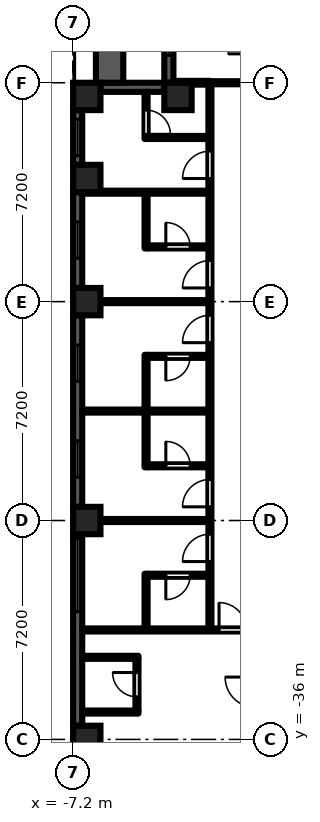
"""IFC4 building model, lengths in metres.
Left out: names, types, materials, properties, quantities, classifications, styles, units other than length and angle.
Written with IfcOpenShell. Run it as: python <this file> out.ifc"""

import sys

from ifc_helpers import new_model, si_unit, direction, frame, frame_2d, origin, origin_2d, place, context, subcontext, project, spatial, rectangle, extrude, element, fill, save


model = new_model("IFC4")
c1 = context("Model", 3, precision=1e-05, world=origin(), true_north=direction((0.0, 1.0)))
c2 = subcontext(c1, "Body", "Model", "MODEL_VIEW")
j1 = project(units=[si_unit("LENGTHUNIT", "METRE"), si_unit("PLANEANGLEUNIT", "RADIAN")], contexts=[c1])
p1 = place(None, origin())
s1 = spatial("IfcSite", under=j1, at=p1, CompositionType="ELEMENT")
p2 = place(p1, origin())
s2 = spatial("IfcBuilding", under=s1, at=p2, CompositionType="ELEMENT")
p3 = place(p2, frame((0.0, 0.0, 66.9)))
s3 = spatial("IfcBuildingStorey", under=s2, at=p3, CompositionType="ELEMENT", Elevation=66.9)
for number, where, z_axis, x_axis in (
    (1, (-6.75, -36.0, 0.0), (0.0, 0.0, 1.0), (1.0, 0.0, 0.0)),
    (2, (-6.75, -28.8, 0.0), (0.0, 0.0, 1.0), (1.0, 0.0, 0.0)),
    (3, (-6.75, -21.6, 0.0), (0.0, 0.0, 1.0), (1.0, 0.0, 0.0)),
    (4, (-6.75, -17.55, 0.0), (0.0, 0.0, 1.0), (1.0, 0.0, 0.0)),
    (5, (-6.75, -14.85, 0.0), (0.0, 0.0, 1.0), (1.0, 0.0, 0.0)),
    (6, (-3.75, -14.85, 0.0), (0.0, 0.0, 1.0), (1.0, 0.0, 0.0)),
):
    element("IfcColumn", number, at=place(p3, frame(where, z_axis=z_axis, x_axis=x_axis)), inside=s3, PredefinedType="COLUMN", context=c2, shape_type="SweptSolid", body=[
        extrude(rectangle(XDim=0.9, YDim=0.9, at=origin_2d()), origin(), (0.0, 0.0, 1.0), 3.0),
    ])
p4 = place(p3, frame((-4.05, -7.2, 0.0), z_axis=(0.0, 0.0, 1.0), x_axis=(0.0, -1.0, 0.0)))
e7 = element("IfcWall", 7, at=p4, inside=s3, PredefinedType="SOLIDWALL", context=c2, shape_type="SweptSolid", body=[
    extrude(rectangle(XDim=7.2, YDim=0.3, at=frame_2d((3.6, 0.0))), origin(), (0.0, 0.0, 1.0), 2.1),
])
p5 = place(p4, frame((3.0, 0.0, 0.0)))
e8 = element("IfcOpeningElement", 8, at=p5, cuts=e7, PredefinedType="OPENING", context=c2, shape_type="SweptSolid", body=[
    extrude(rectangle(XDim=1.2, YDim=2.05, at=frame_2d((0.6, 1.025))), frame((0.0, 0.16, 0.0), z_axis=(0.0, -1.0, 0.0), x_axis=(1.0, 0.0, 0.0)), (0.0, 0.0, 1.0), 0.32),
])
p6 = place(p4, frame((0.9, 0.0, 0.2)))
e9 = element("IfcOpeningElement", 9, at=p6, cuts=e7, PredefinedType="OPENING", context=c2, shape_type="SweptSolid", body=[
    extrude(rectangle(XDim=1.8, YDim=1.85, at=frame_2d((0.9, 0.925))), frame((0.0, 0.16, 0.0), z_axis=(0.0, -1.0, 0.0), x_axis=(1.0, 0.0, 0.0)), (0.0, 0.0, 1.0), 0.32),
])
p7 = place(p4, frame((4.5, 0.0, 0.2)))
e10 = element("IfcOpeningElement", 10, at=p7, cuts=e7, PredefinedType="OPENING", context=c2, shape_type="SweptSolid", body=[
    extrude(rectangle(XDim=1.8, YDim=1.85, at=frame_2d((0.9, 0.925))), frame((0.0, 0.16, 0.0), z_axis=(0.0, -1.0, 0.0), x_axis=(1.0, 0.0, 0.0)), (0.0, 0.0, 1.0), 0.32),
])
p8 = place(p3, frame((-4.2, -14.55, 0.0), z_axis=(0.0, 0.0, 1.0), x_axis=(-1.0, 0.0, 0.0)))
e11 = element("IfcWall", 11, at=p8, inside=s3, PredefinedType="SOLIDWALL", context=c2, shape_type="SweptSolid", body=[
    extrude(rectangle(XDim=2.1, YDim=0.3, at=frame_2d((1.05, 0.0))), origin(), (0.0, 0.0, 1.0), 2.1),
])
p9 = place(p3, frame((-7.05, -15.3, 0.0), z_axis=(0.0, 0.0, 1.0), x_axis=(0.0, -1.0, 0.0)))
e12 = element("IfcWall", 12, at=p9, inside=s3, PredefinedType="SOLIDWALL", context=c2, shape_type="SweptSolid", body=[
    extrude(rectangle(XDim=1.8, YDim=0.3, at=frame_2d((0.9, 0.0))), origin(), (0.0, 0.0, 1.0), 2.1),
])
p10 = place(p9, frame((0.3, 0.0, 0.2)))
e13 = element("IfcOpeningElement", 13, at=p10, cuts=e12, PredefinedType="OPENING", context=c2, shape_type="SweptSolid", body=[
    extrude(rectangle(XDim=1.2, YDim=1.85, at=frame_2d((0.6, 0.925))), frame((0.0, 0.16, 0.0), z_axis=(0.0, -1.0, 0.0), x_axis=(1.0, 0.0, 0.0)), (0.0, 0.0, 1.0), 0.32),
])
p11 = place(p3, frame((-7.05, -18.0, 0.0), z_axis=(0.0, 0.0, 1.0), x_axis=(0.0, -1.0, 0.0)))
e14 = element("IfcWall", 14, at=p11, inside=s3, PredefinedType="SOLIDWALL", context=c2, shape_type="SweptSolid", body=[
    extrude(rectangle(XDim=3.15, YDim=0.3, at=frame_2d((1.575, 0.0))), origin(), (0.0, 0.0, 1.0), 2.1),
])
p12 = place(p11, frame((0.975, 0.0, 0.2)))
e15 = element("IfcOpeningElement", 15, at=p12, cuts=e14, PredefinedType="OPENING", context=c2, shape_type="SweptSolid", body=[
    extrude(rectangle(XDim=1.2, YDim=1.85, at=frame_2d((0.6, 0.925))), frame((0.0, 0.16, 0.0), z_axis=(0.0, -1.0, 0.0), x_axis=(1.0, 0.0, 0.0)), (0.0, 0.0, 1.0), 0.32),
])
p13 = place(p3, frame((-7.05, -22.05, 0.0), z_axis=(0.0, 0.0, 1.0), x_axis=(0.0, -1.0, 0.0)))
e16 = element("IfcWall", 16, at=p13, inside=s3, PredefinedType="SOLIDWALL", context=c2, shape_type="SweptSolid", body=[
    extrude(rectangle(XDim=6.3, YDim=0.3, at=frame_2d((3.15, 0.0))), origin(), (0.0, 0.0, 1.0), 2.1),
])
p14 = place(p13, frame((0.975, 0.0, 0.2)))
e17 = element("IfcOpeningElement", 17, at=p14, cuts=e16, PredefinedType="OPENING", context=c2, shape_type="SweptSolid", body=[
    extrude(rectangle(XDim=1.2, YDim=1.85, at=frame_2d((0.6, 0.925))), frame((0.0, 0.16, 0.0), z_axis=(0.0, -1.0, 0.0), x_axis=(1.0, 0.0, 0.0)), (0.0, 0.0, 1.0), 0.32),
])
p15 = place(p13, frame((4.125, 0.0, 0.2)))
e18 = element("IfcOpeningElement", 18, at=p15, cuts=e16, PredefinedType="OPENING", context=c2, shape_type="SweptSolid", body=[
    extrude(rectangle(XDim=1.2, YDim=1.85, at=frame_2d((0.6, 0.925))), frame((0.0, 0.16, 0.0), z_axis=(0.0, -1.0, 0.0), x_axis=(1.0, 0.0, 0.0)), (0.0, 0.0, 1.0), 0.32),
])
p16 = place(p3, frame((-7.05, -29.25, 0.0), z_axis=(0.0, 0.0, 1.0), x_axis=(0.0, -1.0, 0.0)))
e19 = element("IfcWall", 19, at=p16, inside=s3, PredefinedType="SOLIDWALL", context=c2, shape_type="SweptSolid", body=[
    extrude(rectangle(XDim=6.3, YDim=0.3, at=frame_2d((3.15, 0.0))), origin(), (0.0, 0.0, 1.0), 2.1),
])
p17 = place(p16, frame((0.15, 0.0, 0.2)))
e20 = element("IfcOpeningElement", 20, at=p17, cuts=e19, PredefinedType="OPENING", context=c2, shape_type="SweptSolid", body=[
    extrude(rectangle(XDim=2.4, YDim=1.85, at=frame_2d((1.2, 0.925))), frame((0.0, 0.16, 0.0), z_axis=(0.0, -1.0, 0.0), x_axis=(1.0, 0.0, 0.0)), (0.0, 0.0, 1.0), 0.32),
])
p18 = place(p3, frame((-6.0, -14.4, 0.0), z_axis=(0.0, 0.0, 1.0), x_axis=(0.0, 1.0, 0.0)))
e21 = element("IfcWall", 21, at=p18, inside=s3, PredefinedType="PARAPET", context=c2, shape_type="SweptSolid", body=[
    extrude(rectangle(XDim=7.2, YDim=0.9, at=frame_2d((3.6, 0.0))), origin(), (0.0, 0.0, 1.0), 0.8),
])
for number, where, z_axis, x_axis in (
    (22, (-6.9, -35.1, 0.0), (0.0, 0.0, 1.0), (1.0, 0.0, 0.0)),
    (23, (-6.9, -33.3, 0.0), (0.0, 0.0, 1.0), (1.0, 0.0, 0.0)),
):
    element("IfcWall", number, at=place(p3, frame(where, z_axis=z_axis, x_axis=x_axis)), inside=s3, PredefinedType="PARTITIONING", context=c2, shape_type="SweptSolid", body=[
        extrude(rectangle(XDim=1.85, YDim=0.1, at=frame_2d((0.925, 0.0))), origin(), (0.0, 0.0, 1.0), 2.575),
    ])
p19 = place(p3, frame((-6.9, -32.4, 0.0), z_axis=(0.0, 0.0, 1.0), x_axis=(1.0, 0.0, 0.0)))
e24 = element("IfcWall", 24, at=p19, inside=s3, PredefinedType="PARTITIONING", context=c2, shape_type="SweptSolid", body=[
    extrude(rectangle(XDim=5.625, YDim=0.1, at=frame_2d((2.812, 0.0))), origin(), (0.0, 0.0, 1.0), 2.575),
])
p20 = place(p19, frame((4.5, 0.0, 0.0)))
e25 = element("IfcOpeningElement", 25, at=p20, cuts=e24, PredefinedType="OPENING", context=c2, shape_type="SweptSolid", body=[
    extrude(rectangle(XDim=0.9, YDim=2.1, at=frame_2d((0.45, 1.05))), frame((0.0, 0.06, 0.0), z_axis=(0.0, -1.0, 0.0), x_axis=(1.0, 0.0, 0.0)), (0.0, 0.0, 1.0), 0.12),
])
for number, where, z_axis, x_axis in (
    (26, (-6.9, -28.8, 0.0), (0.0, 0.0, 1.0), (1.0, 0.0, 0.0)),
    (27, (-6.9, -25.2, 0.0), (0.0, 0.0, 1.0), (1.0, 0.0, 0.0)),
    (28, (-6.9, -21.6, 0.0), (0.0, 0.0, 1.0), (1.0, 0.0, 0.0)),
    (29, (-6.9, -18.0, 0.0), (0.0, 0.0, 1.0), (1.0, 0.0, 0.0)),
):
    element("IfcWall", number, at=place(p3, frame(where, z_axis=z_axis, x_axis=x_axis)), inside=s3, PredefinedType="PARTITIONING", context=c2, shape_type="SweptSolid", body=[
        extrude(rectangle(XDim=4.15, YDim=0.1, at=frame_2d((2.075, 0.0))), origin(), (0.0, 0.0, 1.0), 2.575),
    ])
p21 = place(p3, frame((-5.1, -35.05, 0.0), z_axis=(0.0, 0.0, 1.0), x_axis=(0.0, 1.0, 0.0)))
e30 = element("IfcWall", 30, at=p21, inside=s3, PredefinedType="PARTITIONING", context=c2, shape_type="SweptSolid", body=[
    extrude(rectangle(XDim=1.7, YDim=0.1, at=frame_2d((0.85, 0.0))), origin(), (0.0, 0.0, 1.0), 2.575),
])
p22 = place(p21, frame((0.45, 0.0, 0.0)))
e31 = element("IfcOpeningElement", 31, at=p22, cuts=e30, PredefinedType="OPENING", context=c2, shape_type="SweptSolid", body=[
    extrude(rectangle(XDim=0.8, YDim=2.1, at=frame_2d((0.4, 1.05))), frame((0.0, 0.06, 0.0), z_axis=(0.0, -1.0, 0.0), x_axis=(1.0, 0.0, 0.0)), (0.0, 0.0, 1.0), 0.12),
])
p23 = place(p3, frame((-4.8, -32.35, 0.0), z_axis=(0.0, 0.0, 1.0), x_axis=(0.0, 1.0, 0.0)))
e32 = element("IfcWall", 32, at=p23, inside=s3, PredefinedType="PARTITIONING", context=c2, shape_type="SweptSolid", body=[
    extrude(rectangle(XDim=1.8, YDim=0.1, at=frame_2d((0.9, 0.0))), origin(), (0.0, 0.0, 1.0), 2.575),
])
p24 = place(p3, frame((-4.75, -30.6, 0.0), z_axis=(0.0, 0.0, 1.0), x_axis=(1.0, 0.0, 0.0)))
e33 = element("IfcWall", 33, at=p24, inside=s3, PredefinedType="PARTITIONING", context=c2, shape_type="SweptSolid", body=[
    extrude(rectangle(XDim=2.0, YDim=0.1, at=frame_2d((1.0, 0.0))), origin(), (0.0, 0.0, 1.0), 2.575),
])
p25 = place(p24, frame((0.6, 0.0, 0.0)))
e34 = element("IfcOpeningElement", 34, at=p25, cuts=e33, PredefinedType="OPENING", context=c2, shape_type="SweptSolid", body=[
    extrude(rectangle(XDim=0.8, YDim=2.1, at=frame_2d((0.4, 1.05))), frame((0.0, 0.06, 0.0), z_axis=(0.0, -1.0, 0.0), x_axis=(1.0, 0.0, 0.0)), (0.0, 0.0, 1.0), 0.12),
])
p26 = place(p3, frame((-4.8, -27.05, 0.0), z_axis=(0.0, 0.0, 1.0), x_axis=(0.0, 1.0, 0.0)))
e35 = element("IfcWall", 35, at=p26, inside=s3, PredefinedType="PARTITIONING", context=c2, shape_type="SweptSolid", body=[
    extrude(rectangle(XDim=3.7, YDim=0.1, at=frame_2d((1.85, 0.0))), origin(), (0.0, 0.0, 1.0), 2.575),
])
p27 = place(p3, frame((-4.75, -27.0, 0.0), z_axis=(0.0, 0.0, 1.0), x_axis=(1.0, 0.0, 0.0)))
e36 = element("IfcWall", 36, at=p27, inside=s3, PredefinedType="PARTITIONING", context=c2, shape_type="SweptSolid", body=[
    extrude(rectangle(XDim=2.0, YDim=0.1, at=frame_2d((1.0, 0.0))), origin(), (0.0, 0.0, 1.0), 2.575),
])
p28 = place(p27, frame((0.6, 0.0, 0.0)))
e37 = element("IfcOpeningElement", 37, at=p28, cuts=e36, PredefinedType="OPENING", context=c2, shape_type="SweptSolid", body=[
    extrude(rectangle(XDim=0.8, YDim=2.1, at=frame_2d((0.4, 1.05))), frame((0.0, 0.06, 0.0), z_axis=(0.0, -1.0, 0.0), x_axis=(1.0, 0.0, 0.0)), (0.0, 0.0, 1.0), 0.12),
])
p29 = place(p3, frame((-4.75, -23.4, 0.0), z_axis=(0.0, 0.0, 1.0), x_axis=(1.0, 0.0, 0.0)))
e38 = element("IfcWall", 38, at=p29, inside=s3, PredefinedType="PARTITIONING", context=c2, shape_type="SweptSolid", body=[
    extrude(rectangle(XDim=2.0, YDim=0.1, at=frame_2d((1.0, 0.0))), origin(), (0.0, 0.0, 1.0), 2.575),
])
p30 = place(p29, frame((0.6, 0.0, 0.0)))
e39 = element("IfcOpeningElement", 39, at=p30, cuts=e38, PredefinedType="OPENING", context=c2, shape_type="SweptSolid", body=[
    extrude(rectangle(XDim=0.8, YDim=2.1, at=frame_2d((0.4, 1.05))), frame((0.0, 0.06, 0.0), z_axis=(0.0, -1.0, 0.0), x_axis=(1.0, 0.0, 0.0)), (0.0, 0.0, 1.0), 0.12),
])
p31 = place(p3, frame((-4.8, -19.85, 0.0), z_axis=(0.0, 0.0, 1.0), x_axis=(0.0, 1.0, 0.0)))
e40 = element("IfcWall", 40, at=p31, inside=s3, PredefinedType="PARTITIONING", context=c2, shape_type="SweptSolid", body=[
    extrude(rectangle(XDim=1.8, YDim=0.1, at=frame_2d((0.9, 0.0))), origin(), (0.0, 0.0, 1.0), 2.575),
])
p32 = place(p3, frame((-4.75, -19.8, 0.0), z_axis=(0.0, 0.0, 1.0), x_axis=(1.0, 0.0, 0.0)))
e41 = element("IfcWall", 41, at=p32, inside=s3, PredefinedType="PARTITIONING", context=c2, shape_type="SweptSolid", body=[
    extrude(rectangle(XDim=2.0, YDim=0.1, at=frame_2d((1.0, 0.0))), origin(), (0.0, 0.0, 1.0), 2.575),
])
p33 = place(p32, frame((0.6, 0.0, 0.0)))
e42 = element("IfcOpeningElement", 42, at=p33, cuts=e41, PredefinedType="OPENING", context=c2, shape_type="SweptSolid", body=[
    extrude(rectangle(XDim=0.8, YDim=2.1, at=frame_2d((0.4, 1.05))), frame((0.0, 0.06, 0.0), z_axis=(0.0, -1.0, 0.0), x_axis=(1.0, 0.0, 0.0)), (0.0, 0.0, 1.0), 0.12),
])
p34 = place(p3, frame((-4.8, -16.25, 0.0), z_axis=(0.0, 0.0, 1.0), x_axis=(0.0, 1.0, 0.0)))
e43 = element("IfcWall", 43, at=p34, inside=s3, PredefinedType="PARTITIONING", context=c2, shape_type="SweptSolid", body=[
    extrude(rectangle(XDim=1.55, YDim=0.1, at=frame_2d((0.775, 0.0))), origin(), (0.0, 0.0, 1.0), 2.575),
])
p35 = place(p34, frame((0.15, 0.0, 0.0)))
e44 = element("IfcOpeningElement", 44, at=p35, cuts=e43, PredefinedType="OPENING", context=c2, shape_type="SweptSolid", body=[
    extrude(rectangle(XDim=0.8, YDim=2.1, at=frame_2d((0.4, 1.05))), frame((0.0, 0.06, 0.0), z_axis=(0.0, -1.0, 0.0), x_axis=(1.0, 0.0, 0.0)), (0.0, 0.0, 1.0), 0.12),
])
p36 = place(p3, frame((-4.75, -16.2, 0.0), z_axis=(0.0, 0.0, 1.0), x_axis=(1.0, 0.0, 0.0)))
e45 = element("IfcWall", 45, at=p36, inside=s3, PredefinedType="PARTITIONING", context=c2, shape_type="SweptSolid", body=[
    extrude(rectangle(XDim=2.0, YDim=0.1, at=frame_2d((1.0, 0.0))), origin(), (0.0, 0.0, 1.0), 2.575),
])
p37 = place(p3, frame((-3.9, -14.4, 0.0), z_axis=(0.0, 0.0, 1.0), x_axis=(1.0, 0.0, 0.0)))
e46 = element("IfcWall", 46, at=p37, inside=s3, PredefinedType="PARTITIONING", context=c2, shape_type="SweptSolid", body=[
    extrude(rectangle(XDim=1.2, YDim=0.125, at=frame_2d((0.6, 0.0))), origin(), (0.0, 0.0, 1.0), 2.575),
])
p38 = place(p3, frame((-2.7, -32.35, 0.0), z_axis=(0.0, 0.0, 1.0), x_axis=(0.0, 1.0, 0.0)))
e47 = element("IfcWall", 47, at=p38, inside=s3, PredefinedType="PARTITIONING", context=c2, shape_type="SweptSolid", body=[
    extrude(rectangle(XDim=17.888, YDim=0.1, at=frame_2d((8.944, 0.0))), origin(), (0.0, 0.0, 1.0), 2.575),
])
p39 = place(p38, frame((2.2, 0.0, 0.0)))
e48 = element("IfcOpeningElement", 48, at=p39, cuts=e47, PredefinedType="OPENING", context=c2, shape_type="SweptSolid", body=[
    extrude(rectangle(XDim=0.9, YDim=2.1, at=frame_2d((0.45, 1.05))), frame((0.0, 0.06, 0.0), z_axis=(0.0, -1.0, 0.0), x_axis=(1.0, 0.0, 0.0)), (0.0, 0.0, 1.0), 0.12),
])
p40 = place(p38, frame((4.0, 0.0, 0.0)))
e49 = element("IfcOpeningElement", 49, at=p40, cuts=e47, PredefinedType="OPENING", context=c2, shape_type="SweptSolid", body=[
    extrude(rectangle(XDim=0.9, YDim=2.1, at=frame_2d((0.45, 1.05))), frame((0.0, 0.06, 0.0), z_axis=(0.0, -1.0, 0.0), x_axis=(1.0, 0.0, 0.0)), (0.0, 0.0, 1.0), 0.12),
])
p41 = place(p38, frame((9.4, 0.0, 0.0)))
e50 = element("IfcOpeningElement", 50, at=p41, cuts=e47, PredefinedType="OPENING", context=c2, shape_type="SweptSolid", body=[
    extrude(rectangle(XDim=0.9, YDim=2.1, at=frame_2d((0.45, 1.05))), frame((0.0, 0.06, 0.0), z_axis=(0.0, -1.0, 0.0), x_axis=(1.0, 0.0, 0.0)), (0.0, 0.0, 1.0), 0.12),
])
p42 = place(p38, frame((11.2, 0.0, 0.0)))
e51 = element("IfcOpeningElement", 51, at=p42, cuts=e47, PredefinedType="OPENING", context=c2, shape_type="SweptSolid", body=[
    extrude(rectangle(XDim=0.9, YDim=2.1, at=frame_2d((0.45, 1.05))), frame((0.0, 0.06, 0.0), z_axis=(0.0, -1.0, 0.0), x_axis=(1.0, 0.0, 0.0)), (0.0, 0.0, 1.0), 0.12),
])
p43 = place(p38, frame((14.8, 0.0, 0.0)))
e52 = element("IfcOpeningElement", 52, at=p43, cuts=e47, PredefinedType="OPENING", context=c2, shape_type="SweptSolid", body=[
    extrude(rectangle(XDim=0.9, YDim=2.1, at=frame_2d((0.45, 1.05))), frame((0.0, 0.06, 0.0), z_axis=(0.0, -1.0, 0.0), x_axis=(1.0, 0.0, 0.0)), (0.0, 0.0, 1.0), 0.12),
])
p44 = place(p3, frame((-2.7, -14.4, 0.0), z_axis=(0.0, 0.0, 1.0), x_axis=(1.0, 0.0, 0.0)))
e53 = element("IfcWall", 53, at=p44, inside=s3, PredefinedType="PARTITIONING", context=c2, shape_type="SweptSolid", body=[
    extrude(rectangle(XDim=1.425, YDim=0.1, at=frame_2d((0.712, 0.0))), origin(), (0.0, 0.0, 1.0), 2.575),
])
p45 = place(p7, origin())
e54 = element("IfcWindow", 54, at=p45, inside=s3, PartitioningType="SINGLE_PANEL", PredefinedType="WINDOW", context=c2, shape_type="SweptSolid", body=[
    extrude(rectangle(XDim=1.8, YDim=1.85, at=frame_2d((0.9, 0.925))), frame((0.0, 0.03, 0.0), z_axis=(0.0, -1.0, 0.0), x_axis=(1.0, 0.0, 0.0)), (0.0, 0.0, 1.0), 0.06),
])
fill(e10, e54)
p46 = place(p10, origin())
e55 = element("IfcWindow", 55, at=p46, inside=s3, PartitioningType="SINGLE_PANEL", PredefinedType="WINDOW", context=c2, shape_type="SweptSolid", body=[
    extrude(rectangle(XDim=1.2, YDim=1.85, at=frame_2d((0.6, 0.925))), frame((0.0, 0.03, 0.0), z_axis=(0.0, -1.0, 0.0), x_axis=(1.0, 0.0, 0.0)), (0.0, 0.0, 1.0), 0.06),
])
fill(e13, e55)
p47 = place(p12, origin())
e56 = element("IfcWindow", 56, at=p47, inside=s3, PartitioningType="SINGLE_PANEL", PredefinedType="WINDOW", context=c2, shape_type="SweptSolid", body=[
    extrude(rectangle(XDim=1.2, YDim=1.85, at=frame_2d((0.6, 0.925))), frame((0.0, 0.03, 0.0), z_axis=(0.0, -1.0, 0.0), x_axis=(1.0, 0.0, 0.0)), (0.0, 0.0, 1.0), 0.06),
])
fill(e15, e56)
p48 = place(p14, origin())
e57 = element("IfcWindow", 57, at=p48, inside=s3, PartitioningType="SINGLE_PANEL", PredefinedType="WINDOW", context=c2, shape_type="SweptSolid", body=[
    extrude(rectangle(XDim=1.2, YDim=1.85, at=frame_2d((0.6, 0.925))), frame((0.0, 0.03, 0.0), z_axis=(0.0, -1.0, 0.0), x_axis=(1.0, 0.0, 0.0)), (0.0, 0.0, 1.0), 0.06),
])
fill(e17, e57)
p49 = place(p15, origin())
e58 = element("IfcWindow", 58, at=p49, inside=s3, PartitioningType="SINGLE_PANEL", PredefinedType="WINDOW", context=c2, shape_type="SweptSolid", body=[
    extrude(rectangle(XDim=1.2, YDim=1.85, at=frame_2d((0.6, 0.925))), frame((0.0, 0.03, 0.0), z_axis=(0.0, -1.0, 0.0), x_axis=(1.0, 0.0, 0.0)), (0.0, 0.0, 1.0), 0.06),
])
fill(e18, e58)
p50 = place(p17, origin())
e59 = element("IfcWindow", 59, at=p50, inside=s3, PartitioningType="SINGLE_PANEL", PredefinedType="WINDOW", context=c2, shape_type="SweptSolid", body=[
    extrude(rectangle(XDim=2.4, YDim=1.85, at=frame_2d((1.2, 0.925))), frame((0.0, 0.03, 0.0), z_axis=(0.0, -1.0, 0.0), x_axis=(1.0, 0.0, 0.0)), (0.0, 0.0, 1.0), 0.06),
])
fill(e20, e59)
p51 = place(p22, origin())
e60 = element("IfcDoor", 60, at=p51, inside=s3, OperationType="SINGLE_SWING_RIGHT", PredefinedType="DOOR", context=c2, shape_type="SweptSolid", body=[
    extrude(rectangle(XDim=0.8, YDim=2.1, at=frame_2d((0.4, 1.05))), frame((0.0, 0.025, 0.0), z_axis=(0.0, -1.0, 0.0), x_axis=(1.0, 0.0, 0.0)), (0.0, 0.0, 1.0), 0.05),
])
fill(e31, e60)
p52 = place(p39, origin())
e61 = element("IfcDoor", 61, at=p52, inside=s3, OperationType="SINGLE_SWING_LEFT", PredefinedType="DOOR", context=c2, shape_type="SweptSolid", body=[
    extrude(rectangle(XDim=0.9, YDim=2.1, at=frame_2d((0.45, 1.05))), frame((0.0, 0.025, 0.0), z_axis=(0.0, -1.0, 0.0), x_axis=(1.0, 0.0, 0.0)), (0.0, 0.0, 1.0), 0.05),
])
fill(e48, e61)
p53 = place(p40, origin())
e62 = element("IfcDoor", 62, at=p53, inside=s3, OperationType="SINGLE_SWING_LEFT", PredefinedType="DOOR", context=c2, shape_type="SweptSolid", body=[
    extrude(rectangle(XDim=0.9, YDim=2.1, at=frame_2d((0.45, 1.05))), frame((0.0, 0.025, 0.0), z_axis=(0.0, -1.0, 0.0), x_axis=(1.0, 0.0, 0.0)), (0.0, 0.0, 1.0), 0.05),
])
fill(e49, e62)
p54 = place(p41, origin())
e63 = element("IfcDoor", 63, at=p54, inside=s3, OperationType="SINGLE_SWING_LEFT", PredefinedType="DOOR", context=c2, shape_type="SweptSolid", body=[
    extrude(rectangle(XDim=0.9, YDim=2.1, at=frame_2d((0.45, 1.05))), frame((0.0, 0.025, 0.0), z_axis=(0.0, -1.0, 0.0), x_axis=(1.0, 0.0, 0.0)), (0.0, 0.0, 1.0), 0.05),
])
fill(e50, e63)
p55 = place(p42, origin())
e64 = element("IfcDoor", 64, at=p55, inside=s3, OperationType="SINGLE_SWING_LEFT", PredefinedType="DOOR", context=c2, shape_type="SweptSolid", body=[
    extrude(rectangle(XDim=0.9, YDim=2.1, at=frame_2d((0.45, 1.05))), frame((0.0, 0.025, 0.0), z_axis=(0.0, -1.0, 0.0), x_axis=(1.0, 0.0, 0.0)), (0.0, 0.0, 1.0), 0.05),
])
fill(e51, e64)
p56 = place(p43, origin())
e65 = element("IfcDoor", 65, at=p56, inside=s3, OperationType="SINGLE_SWING_LEFT", PredefinedType="DOOR", context=c2, shape_type="SweptSolid", body=[
    extrude(rectangle(XDim=0.9, YDim=2.1, at=frame_2d((0.45, 1.05))), frame((0.0, 0.025, 0.0), z_axis=(0.0, -1.0, 0.0), x_axis=(1.0, 0.0, 0.0)), (0.0, 0.0, 1.0), 0.05),
])
fill(e52, e65)
p57 = place(p20, origin())
e66 = element("IfcDoor", 66, at=p57, inside=s3, OperationType="SINGLE_SWING_LEFT", PredefinedType="DOOR", context=c2, shape_type="SweptSolid", body=[
    extrude(rectangle(XDim=0.9, YDim=2.1, at=frame_2d((0.45, 1.05))), frame((0.0, 0.025, 0.0), z_axis=(0.0, -1.0, 0.0), x_axis=(1.0, 0.0, 0.0)), (0.0, 0.0, 1.0), 0.05),
])
fill(e25, e66)
p58 = place(p35, frame((0.8, 0.0, 0.0), z_axis=(0.0, 0.0, 1.0), x_axis=(-1.0, 0.0, 0.0)))
e67 = element("IfcDoor", 67, at=p58, inside=s3, OperationType="SINGLE_SWING_RIGHT", PredefinedType="DOOR", context=c2, shape_type="SweptSolid", body=[
    extrude(rectangle(XDim=0.8, YDim=2.1, at=frame_2d((0.4, 1.05))), frame((0.0, 0.025, 0.0), z_axis=(0.0, -1.0, 0.0), x_axis=(1.0, 0.0, 0.0)), (0.0, 0.0, 1.0), 0.05),
])
fill(e44, e67)
p59 = place(p33, origin())
e68 = element("IfcDoor", 68, at=p59, inside=s3, OperationType="SINGLE_SWING_LEFT", PredefinedType="DOOR", context=c2, shape_type="SweptSolid", body=[
    extrude(rectangle(XDim=0.8, YDim=2.1, at=frame_2d((0.4, 1.05))), frame((0.0, 0.025, 0.0), z_axis=(0.0, -1.0, 0.0), x_axis=(1.0, 0.0, 0.0)), (0.0, 0.0, 1.0), 0.05),
])
fill(e42, e68)
p60 = place(p30, frame((0.8, 0.0, 0.0), z_axis=(0.0, 0.0, 1.0), x_axis=(-1.0, 0.0, 0.0)))
e69 = element("IfcDoor", 69, at=p60, inside=s3, OperationType="SINGLE_SWING_RIGHT", PredefinedType="DOOR", context=c2, shape_type="SweptSolid", body=[
    extrude(rectangle(XDim=0.8, YDim=2.1, at=frame_2d((0.4, 1.05))), frame((0.0, 0.025, 0.0), z_axis=(0.0, -1.0, 0.0), x_axis=(1.0, 0.0, 0.0)), (0.0, 0.0, 1.0), 0.05),
])
fill(e39, e69)
p61 = place(p28, origin())
e70 = element("IfcDoor", 70, at=p61, inside=s3, OperationType="SINGLE_SWING_LEFT", PredefinedType="DOOR", context=c2, shape_type="SweptSolid", body=[
    extrude(rectangle(XDim=0.8, YDim=2.1, at=frame_2d((0.4, 1.05))), frame((0.0, 0.025, 0.0), z_axis=(0.0, -1.0, 0.0), x_axis=(1.0, 0.0, 0.0)), (0.0, 0.0, 1.0), 0.05),
])
fill(e37, e70)
p62 = place(p25, frame((0.8, 0.0, 0.0), z_axis=(0.0, 0.0, 1.0), x_axis=(-1.0, 0.0, 0.0)))
e71 = element("IfcDoor", 71, at=p62, inside=s3, OperationType="SINGLE_SWING_RIGHT", PredefinedType="DOOR", context=c2, shape_type="SweptSolid", body=[
    extrude(rectangle(XDim=0.8, YDim=2.1, at=frame_2d((0.4, 1.05))), frame((0.0, 0.025, 0.0), z_axis=(0.0, -1.0, 0.0), x_axis=(1.0, 0.0, 0.0)), (0.0, 0.0, 1.0), 0.05),
])
fill(e34, e71)
save(model, sys.argv[1])
